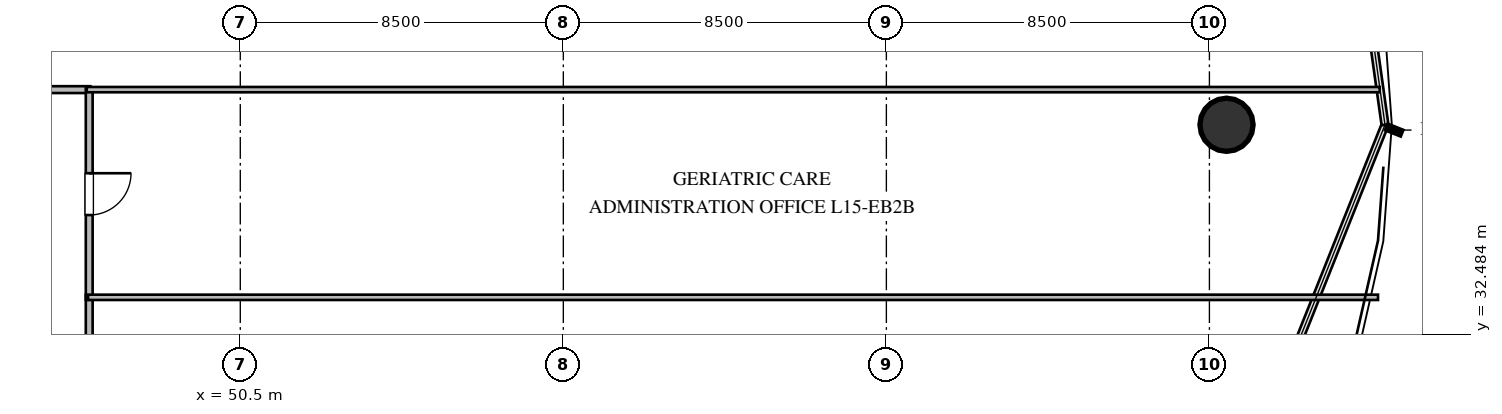
"""IFC4 building model, lengths in metres.
Left out: names, types, materials, properties, quantities, classifications, styles, units other than length and angle.
Written with IfcOpenShell. Run it as: python <this file> out.ifc"""

import sys

from ifc_helpers import new_model, si_unit, direction, frame, frame_2d, origin, origin_2d, place, context, subcontext, project, spatial, rectangle, circle, extrude, element, fill, save


model = new_model("IFC4")
c1 = context("Model", 3, precision=1e-05, world=origin(), true_north=direction((0.0, 1.0)))
c2 = subcontext(c1, "Body", "Model", "MODEL_VIEW")
j1 = project(units=[si_unit("LENGTHUNIT", "METRE"), si_unit("PLANEANGLEUNIT", "RADIAN")], contexts=[c1])
p1 = place(None, origin())
s1 = spatial("IfcSite", under=j1, at=p1, CompositionType="ELEMENT")
p2 = place(p1, origin())
s2 = spatial("IfcBuilding", under=s1, at=p2, CompositionType="ELEMENT")
p3 = place(p2, frame((0.0, 0.0, 60.0)))
s3 = spatial("IfcBuildingStorey", under=s2, at=p3, CompositionType="ELEMENT", Elevation=60.0)
p4 = place(p3, frame((76.45, 38.0, 0.0), z_axis=(0.0, 0.0, 1.0), x_axis=(1.0, 0.0, 0.0)))
e1 = element("IfcColumn", 1, at=p4, inside=s3, PredefinedType="COLUMN", context=c2, shape_type="SweptSolid", body=[
    extrude(circle(Radius=0.7, at=origin_2d()), origin(), (0.0, 0.0, 1.0), 3.6),
])
p5 = place(p3, frame((41.185, 38.925, 0.0), z_axis=(0.0, 0.0, 1.0), x_axis=(1.0, 0.0, 0.0)))
e2 = element("IfcWall", 2, at=p5, inside=s3, PredefinedType="PARTITIONING", context=c2, shape_type="SweptSolid", body=[
    extrude(rectangle(XDim=5.37, YDim=0.18, at=frame_2d((2.685, 0.0))), origin(), (0.0, 0.0, 1.0), 3.36),
])
p6 = place(p5, frame((2.135, 0.0, 0.0)))
e3 = element("IfcOpeningElement", 3, at=p6, cuts=e2, PredefinedType="OPENING", context=c2, shape_type="SweptSolid", body=[
    extrude(rectangle(XDim=1.1, YDim=2.1, at=frame_2d((0.55, 1.05))), frame((0.0, 0.1, 0.0), z_axis=(0.0, -1.0, 0.0), x_axis=(1.0, 0.0, 0.0)), (0.0, 0.0, 1.0), 0.2),
])
p7 = place(p3, frame((46.525, 33.525, 0.0), z_axis=(0.0, 0.0, 1.0), x_axis=(0.0, -1.0, 0.0)))
e4 = element("IfcWall", 4, at=p7, inside=s3, PredefinedType="PARTITIONING", context=c2, shape_type="SweptSolid", body=[
    extrude(rectangle(XDim=5.59, YDim=0.18, at=frame_2d((2.795, 0.0))), origin(), (0.0, 0.0, 1.0), 3.36),
])
p8 = place(p7, frame((2.245, 0.0, 0.0)))
e5 = element("IfcOpeningElement", 5, at=p8, cuts=e4, PredefinedType="OPENING", context=c2, shape_type="SweptSolid", body=[
    extrude(rectangle(XDim=1.1, YDim=2.1, at=frame_2d((0.55, 1.05))), frame((0.0, 0.1, 0.0), z_axis=(0.0, -1.0, 0.0), x_axis=(1.0, 0.0, 0.0)), (0.0, 0.0, 1.0), 0.2),
])
p9 = place(p3, frame((46.525, 38.955, 0.0), z_axis=(0.0, 0.0, 1.0), x_axis=(0.0, -1.0, 0.0)))
e6 = element("IfcWall", 6, at=p9, inside=s3, PredefinedType="PARTITIONING", context=c2, shape_type="SweptSolid", body=[
    extrude(rectangle(XDim=5.56, YDim=0.18, at=frame_2d((2.78, 0.0))), origin(), (0.0, 0.0, 1.0), 3.36),
])
p10 = place(p9, frame((2.23, 0.0, 0.0)))
e7 = element("IfcOpeningElement", 7, at=p10, cuts=e6, PredefinedType="OPENING", context=c2, shape_type="SweptSolid", body=[
    extrude(rectangle(XDim=1.1, YDim=2.1, at=frame_2d((0.55, 1.05))), frame((0.0, 0.1, 0.0), z_axis=(0.0, -1.0, 0.0), x_axis=(1.0, 0.0, 0.0)), (0.0, 0.0, 1.0), 0.2),
])
p11 = place(p3, frame((80.48, 38.925, 0.0), z_axis=(0.0, 0.0, 1.0), x_axis=(-1.0, 0.0, 0.0)))
e8 = element("IfcWall", 8, at=p11, inside=s3, PredefinedType="PARTITIONING", context=c2, shape_type="SweptSolid", body=[
    extrude(rectangle(XDim=34.02, YDim=0.14, at=frame_2d((17.01, 0.0))), origin(), (0.0, 0.0, 1.0), 3.36),
])
p12 = place(p3, frame((46.495, 33.46, 0.0), z_axis=(0.0, 0.0, 1.0), x_axis=(1.0, 0.0, 0.0)))
e9 = element("IfcWall", 9, at=p12, inside=s3, PredefinedType="PARTITIONING", context=c2, shape_type="SweptSolid", body=[
    extrude(rectangle(XDim=33.941, YDim=0.14, at=frame_2d((16.97, 0.0))), origin(), (0.0, 0.0, 1.0), 3.36),
])
p13 = place(p10, origin())
e10 = element("IfcDoor", 10, at=p13, inside=s3, OperationType="SINGLE_SWING_LEFT", PredefinedType="DOOR", context=c2, shape_type="SweptSolid", body=[
    extrude(rectangle(XDim=1.1, YDim=2.1, at=frame_2d((0.55, 1.05))), frame((0.0, 0.025, 0.0), z_axis=(0.0, -1.0, 0.0), x_axis=(1.0, 0.0, 0.0)), (0.0, 0.0, 1.0), 0.05),
])
fill(e7, e10)
save(model, sys.argv[1])
